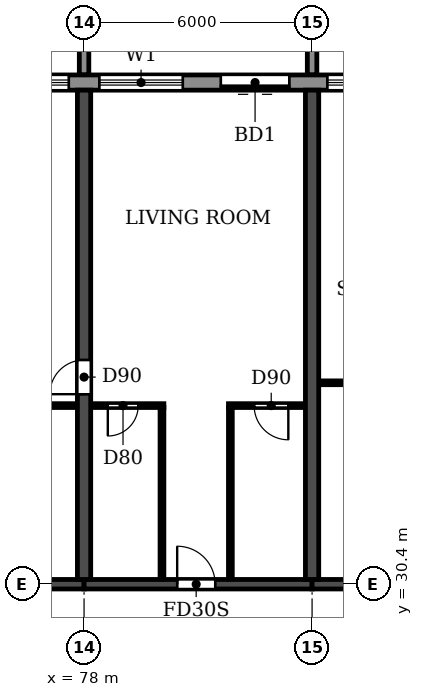
"""IFC4 building model, lengths in metres.
Left out: names, types, materials, properties, quantities, classifications, styles, units other than length and angle.
Written with IfcOpenShell. Run it as: python <this file> out.ifc"""

import sys

from ifc_helpers import new_model, si_unit, direction, frame, frame_2d, origin, place, context, subcontext, project, spatial, polyline, rectangle, outline, extrude, source, transform, mapped, element, fill, save


model = new_model("IFC4")
c1 = context("Model", 3, precision=1e-05, world=origin(), true_north=direction((0.0, 1.0)))
c2 = subcontext(c1, "Body", "Model", "MODEL_VIEW")
j1 = project(units=[si_unit("LENGTHUNIT", "METRE"), si_unit("PLANEANGLEUNIT", "RADIAN")], contexts=[c1])
p1 = place(None, origin())
s1 = spatial("IfcSite", under=j1, at=p1, CompositionType="ELEMENT")
p2 = place(p1, origin())
s2 = spatial("IfcBuilding", under=s1, at=p2, CompositionType="ELEMENT")
p3 = place(p2, frame((0.0, 0.0, 72.9)))
s3 = spatial("IfcBuildingStorey", under=s2, at=p3, CompositionType="ELEMENT", Elevation=72.9)
p4 = place(p3, frame((78.0, 30.525, 0.0), z_axis=(0.0, 0.0, 1.0), x_axis=(0.0, 1.0, 0.0)))
e1 = element("IfcWall", 1, at=p4, inside=s3, PredefinedType="SHEAR", context=c2, shape_type="SweptSolid", body=[
    extrude(rectangle(XDim=12.875, YDim=0.35, at=frame_2d((6.438, 0.0))), origin(), (0.0, 0.0, 1.0), 3.06),
])
p5 = place(p4, frame((4.875, 0.0, 0.0)))
e2 = element("IfcOpeningElement", 2, at=p5, cuts=e1, PredefinedType="OPENING", context=c2, shape_type="SweptSolid", body=[
    extrude(rectangle(XDim=0.9, YDim=2.1, at=frame_2d((0.45, 1.05))), frame((0.0, 0.185, 0.0), z_axis=(0.0, -1.0, 0.0), x_axis=(1.0, 0.0, 0.0)), (0.0, 0.0, 1.0), 0.37),
])
p6 = place(p3, frame((84.0, 30.525, 0.0), z_axis=(0.0, 0.0, 1.0), x_axis=(0.0, 1.0, 0.0)))
e3 = element("IfcWall", 3, at=p6, inside=s3, PredefinedType="SHEAR", context=c2, shape_type="SweptSolid", body=[
    extrude(rectangle(XDim=12.875, YDim=0.35, at=frame_2d((6.438, 0.0))), origin(), (0.0, 0.0, 1.0), 3.06),
])
p7 = place(p3, frame((72.0, 30.4, 0.0), z_axis=(0.0, 0.0, 1.0), x_axis=(1.0, 0.0, 0.0)))
e4 = element("IfcWall", 4, at=p7, inside=s3, PredefinedType="SHEAR", context=c2, shape_type="SweptSolid", body=[
    extrude(rectangle(XDim=6.0, YDim=0.25, at=frame_2d((3.0, 0.0))), origin(), (0.0, 0.0, 1.0), 2.46),
])
p8 = place(p3, frame((78.0, 30.4, 0.0), z_axis=(0.0, 0.0, 1.0), x_axis=(1.0, 0.0, 0.0)))
e5 = element("IfcWall", 5, at=p8, inside=s3, PredefinedType="SHEAR", context=c2, shape_type="SweptSolid", body=[
    extrude(rectangle(XDim=6.0, YDim=0.25, at=frame_2d((3.0, 0.0))), origin(), (0.0, 0.0, 1.0), 2.46),
])
p9 = place(p8, frame((2.45, 0.0, 0.0)))
e6 = element("IfcOpeningElement", 6, at=p9, cuts=e5, PredefinedType="OPENING", context=c2, shape_type="SweptSolid", body=[
    extrude(rectangle(XDim=1.0, YDim=2.1, at=frame_2d((0.5, 1.05))), frame((0.0, 0.135, 0.0), z_axis=(0.0, -1.0, 0.0), x_axis=(1.0, 0.0, 0.0)), (0.0, 0.0, 1.0), 0.27),
])
p10 = place(p3, frame((84.0, 30.4, 0.0), z_axis=(0.0, 0.0, 1.0), x_axis=(1.0, 0.0, 0.0)))
e7 = element("IfcWall", 7, at=p10, inside=s3, PredefinedType="SHEAR", context=c2, shape_type="SweptSolid", body=[
    extrude(rectangle(XDim=6.0, YDim=0.25, at=frame_2d((3.0, 0.0))), origin(), (0.0, 0.0, 1.0), 2.46),
])
p11 = place(p10, frame((2.55, 0.0, 0.0)))
e8 = element("IfcOpeningElement", 8, at=p11, cuts=e7, PredefinedType="OPENING", context=c2, shape_type="SweptSolid", body=[
    extrude(rectangle(XDim=1.0, YDim=2.1, at=frame_2d((0.5, 1.05))), frame((0.0, 0.135, 0.0), z_axis=(0.0, -1.0, 0.0), x_axis=(1.0, 0.0, 0.0)), (0.0, 0.0, 1.0), 0.27),
])
p12 = place(p3, frame((91.317, 43.6, 0.0), z_axis=(0.0, 0.0, 1.0), x_axis=(-1.0, 0.0, 0.0)))
e9 = element("IfcWall", 9, at=p12, inside=s3, PredefinedType="STANDARD", context=c2, shape_type="SweptSolid", body=[
    extrude(rectangle(XDim=80.634, YDim=0.4, at=frame_2d((40.317, 0.0))), origin(), (0.0, 0.0, 1.0), 3.06),
])
p13 = place(p12, frame((76.717, 0.0, 0.9)))
e10 = element("IfcOpeningElement", 10, at=p13, cuts=e9, PredefinedType="OPENING", context=c2, shape_type="SweptSolid", body=[
    extrude(rectangle(XDim=2.2, YDim=1.5, at=frame_2d((1.1, 0.75))), frame((0.0, 0.21, 0.0), z_axis=(0.0, -1.0, 0.0), x_axis=(1.0, 0.0, 0.0)), (0.0, 0.0, 1.0), 0.42),
])
p14 = place(p12, frame((73.917, 0.0, 0.0)))
e11 = element("IfcOpeningElement", 11, at=p14, cuts=e9, PredefinedType="OPENING", context=c2, shape_type="SweptSolid", body=[
    extrude(rectangle(XDim=1.8, YDim=2.4, at=frame_2d((0.9, 1.2))), frame((0.0, 0.21, 0.0), z_axis=(0.0, -1.0, 0.0), x_axis=(1.0, 0.0, 0.0)), (0.0, 0.0, 1.0), 0.42),
])
p15 = place(p12, frame((70.917, 0.0, 0.0)))
e12 = element("IfcOpeningElement", 12, at=p15, cuts=e9, PredefinedType="OPENING", context=c2, shape_type="SweptSolid", body=[
    extrude(rectangle(XDim=1.8, YDim=2.4, at=frame_2d((0.9, 1.2))), frame((0.0, 0.21, 0.0), z_axis=(0.0, -1.0, 0.0), x_axis=(1.0, 0.0, 0.0)), (0.0, 0.0, 1.0), 0.42),
])
p16 = place(p12, frame((67.717, 0.0, 0.9)))
e13 = element("IfcOpeningElement", 13, at=p16, cuts=e9, PredefinedType="OPENING", context=c2, shape_type="SweptSolid", body=[
    extrude(rectangle(XDim=2.2, YDim=1.5, at=frame_2d((1.1, 0.75))), frame((0.0, 0.21, 0.0), z_axis=(0.0, -1.0, 0.0), x_axis=(1.0, 0.0, 0.0)), (0.0, 0.0, 1.0), 0.42),
])
p17 = place(p12, frame((64.717, 0.0, 0.9)))
e14 = element("IfcOpeningElement", 14, at=p17, cuts=e9, PredefinedType="OPENING", context=c2, shape_type="SweptSolid", body=[
    extrude(rectangle(XDim=2.2, YDim=1.5, at=frame_2d((1.1, 0.75))), frame((0.0, 0.21, 0.0), z_axis=(0.0, -1.0, 0.0), x_axis=(1.0, 0.0, 0.0)), (0.0, 0.0, 1.0), 0.42),
])
p18 = place(p12, frame((61.917, 0.0, 0.0)))
e15 = element("IfcOpeningElement", 15, at=p18, cuts=e9, PredefinedType="OPENING", context=c2, shape_type="SweptSolid", body=[
    extrude(rectangle(XDim=1.8, YDim=2.4, at=frame_2d((0.9, 1.2))), frame((0.0, 0.21, 0.0), z_axis=(0.0, -1.0, 0.0), x_axis=(1.0, 0.0, 0.0)), (0.0, 0.0, 1.0), 0.42),
])
p19 = place(p12, frame((58.717, 0.0, 0.9)))
e16 = element("IfcOpeningElement", 16, at=p19, cuts=e9, PredefinedType="OPENING", context=c2, shape_type="SweptSolid", body=[
    extrude(rectangle(XDim=2.2, YDim=1.5, at=frame_2d((1.1, 0.75))), frame((0.0, 0.21, 0.0), z_axis=(0.0, -1.0, 0.0), x_axis=(1.0, 0.0, 0.0)), (0.0, 0.0, 1.0), 0.42),
])
p20 = place(p12, frame((55.917, 0.0, 0.0)))
e17 = element("IfcOpeningElement", 17, at=p20, cuts=e9, PredefinedType="OPENING", context=c2, shape_type="SweptSolid", body=[
    extrude(rectangle(XDim=1.8, YDim=2.4, at=frame_2d((0.9, 1.2))), frame((0.0, 0.21, 0.0), z_axis=(0.0, -1.0, 0.0), x_axis=(1.0, 0.0, 0.0)), (0.0, 0.0, 1.0), 0.42),
])
p21 = place(p12, frame((52.717, 0.0, 0.9)))
e18 = element("IfcOpeningElement", 18, at=p21, cuts=e9, PredefinedType="OPENING", context=c2, shape_type="SweptSolid", body=[
    extrude(rectangle(XDim=2.2, YDim=1.5, at=frame_2d((1.1, 0.75))), frame((0.0, 0.21, 0.0), z_axis=(0.0, -1.0, 0.0), x_axis=(1.0, 0.0, 0.0)), (0.0, 0.0, 1.0), 0.42),
])
p22 = place(p12, frame((49.717, 0.0, 0.9)))
e19 = element("IfcOpeningElement", 19, at=p22, cuts=e9, PredefinedType="OPENING", context=c2, shape_type="SweptSolid", body=[
    extrude(rectangle(XDim=2.2, YDim=1.5, at=frame_2d((1.1, 0.75))), frame((0.0, 0.21, 0.0), z_axis=(0.0, -1.0, 0.0), x_axis=(1.0, 0.0, 0.0)), (0.0, 0.0, 1.0), 0.42),
])
p23 = place(p12, frame((46.917, 0.0, 0.0)))
e20 = element("IfcOpeningElement", 20, at=p23, cuts=e9, PredefinedType="OPENING", context=c2, shape_type="SweptSolid", body=[
    extrude(rectangle(XDim=1.8, YDim=2.4, at=frame_2d((0.9, 1.2))), frame((0.0, 0.21, 0.0), z_axis=(0.0, -1.0, 0.0), x_axis=(1.0, 0.0, 0.0)), (0.0, 0.0, 1.0), 0.42),
])
p24 = place(p12, frame((43.717, 0.0, 0.9)))
e21 = element("IfcOpeningElement", 21, at=p24, cuts=e9, PredefinedType="OPENING", context=c2, shape_type="SweptSolid", body=[
    extrude(rectangle(XDim=2.2, YDim=1.5, at=frame_2d((1.1, 0.75))), frame((0.0, 0.21, 0.0), z_axis=(0.0, -1.0, 0.0), x_axis=(1.0, 0.0, 0.0)), (0.0, 0.0, 1.0), 0.42),
])
p25 = place(p12, frame((40.717, 0.0, 0.9)))
e22 = element("IfcOpeningElement", 22, at=p25, cuts=e9, PredefinedType="OPENING", context=c2, shape_type="SweptSolid", body=[
    extrude(rectangle(XDim=2.2, YDim=1.5, at=frame_2d((1.1, 0.75))), frame((0.0, 0.21, 0.0), z_axis=(0.0, -1.0, 0.0), x_axis=(1.0, 0.0, 0.0)), (0.0, 0.0, 1.0), 0.42),
])
p26 = place(p12, frame((37.917, 0.0, 0.0)))
e23 = element("IfcOpeningElement", 23, at=p26, cuts=e9, PredefinedType="OPENING", context=c2, shape_type="SweptSolid", body=[
    extrude(rectangle(XDim=1.8, YDim=2.4, at=frame_2d((0.9, 1.2))), frame((0.0, 0.21, 0.0), z_axis=(0.0, -1.0, 0.0), x_axis=(1.0, 0.0, 0.0)), (0.0, 0.0, 1.0), 0.42),
])
p27 = place(p12, frame((34.717, 0.0, 0.9)))
e24 = element("IfcOpeningElement", 24, at=p27, cuts=e9, PredefinedType="OPENING", context=c2, shape_type="SweptSolid", body=[
    extrude(rectangle(XDim=2.2, YDim=1.5, at=frame_2d((1.1, 0.75))), frame((0.0, 0.21, 0.0), z_axis=(0.0, -1.0, 0.0), x_axis=(1.0, 0.0, 0.0)), (0.0, 0.0, 1.0), 0.42),
])
p28 = place(p12, frame((31.917, 0.0, 0.0)))
e25 = element("IfcOpeningElement", 25, at=p28, cuts=e9, PredefinedType="OPENING", context=c2, shape_type="SweptSolid", body=[
    extrude(rectangle(XDim=1.8, YDim=2.4, at=frame_2d((0.9, 1.2))), frame((0.0, 0.21, 0.0), z_axis=(0.0, -1.0, 0.0), x_axis=(1.0, 0.0, 0.0)), (0.0, 0.0, 1.0), 0.42),
])
p29 = place(p12, frame((28.717, 0.0, 0.9)))
e26 = element("IfcOpeningElement", 26, at=p29, cuts=e9, PredefinedType="OPENING", context=c2, shape_type="SweptSolid", body=[
    extrude(rectangle(XDim=2.2, YDim=1.5, at=frame_2d((1.1, 0.75))), frame((0.0, 0.21, 0.0), z_axis=(0.0, -1.0, 0.0), x_axis=(1.0, 0.0, 0.0)), (0.0, 0.0, 1.0), 0.42),
])
p30 = place(p12, frame((25.717, 0.0, 0.9)))
e27 = element("IfcOpeningElement", 27, at=p30, cuts=e9, PredefinedType="OPENING", context=c2, shape_type="SweptSolid", body=[
    extrude(rectangle(XDim=2.2, YDim=1.5, at=frame_2d((1.1, 0.75))), frame((0.0, 0.21, 0.0), z_axis=(0.0, -1.0, 0.0), x_axis=(1.0, 0.0, 0.0)), (0.0, 0.0, 1.0), 0.42),
])
p31 = place(p12, frame((22.717, 0.0, 0.9)))
e28 = element("IfcOpeningElement", 28, at=p31, cuts=e9, PredefinedType="OPENING", context=c2, shape_type="SweptSolid", body=[
    extrude(rectangle(XDim=2.2, YDim=1.5, at=frame_2d((1.1, 0.75))), frame((0.0, 0.21, 0.0), z_axis=(0.0, -1.0, 0.0), x_axis=(1.0, 0.0, 0.0)), (0.0, 0.0, 1.0), 0.42),
])
p32 = place(p12, frame((19.917, 0.0, 0.0)))
e29 = element("IfcOpeningElement", 29, at=p32, cuts=e9, PredefinedType="OPENING", context=c2, shape_type="SweptSolid", body=[
    extrude(rectangle(XDim=1.8, YDim=2.4, at=frame_2d((0.9, 1.2))), frame((0.0, 0.21, 0.0), z_axis=(0.0, -1.0, 0.0), x_axis=(1.0, 0.0, 0.0)), (0.0, 0.0, 1.0), 0.42),
])
p33 = place(p12, frame((16.717, 0.0, 0.9)))
e30 = element("IfcOpeningElement", 30, at=p33, cuts=e9, PredefinedType="OPENING", context=c2, shape_type="SweptSolid", body=[
    extrude(rectangle(XDim=2.2, YDim=1.5, at=frame_2d((1.1, 0.75))), frame((0.0, 0.21, 0.0), z_axis=(0.0, -1.0, 0.0), x_axis=(1.0, 0.0, 0.0)), (0.0, 0.0, 1.0), 0.42),
])
p34 = place(p12, frame((13.717, 0.0, 0.9)))
e31 = element("IfcOpeningElement", 31, at=p34, cuts=e9, PredefinedType="OPENING", context=c2, shape_type="SweptSolid", body=[
    extrude(rectangle(XDim=2.2, YDim=1.5, at=frame_2d((1.1, 0.75))), frame((0.0, 0.21, 0.0), z_axis=(0.0, -1.0, 0.0), x_axis=(1.0, 0.0, 0.0)), (0.0, 0.0, 1.0), 0.42),
])
p35 = place(p12, frame((10.717, 0.0, 0.9)))
e32 = element("IfcOpeningElement", 32, at=p35, cuts=e9, PredefinedType="OPENING", context=c2, shape_type="SweptSolid", body=[
    extrude(rectangle(XDim=2.2, YDim=1.5, at=frame_2d((1.1, 0.75))), frame((0.0, 0.21, 0.0), z_axis=(0.0, -1.0, 0.0), x_axis=(1.0, 0.0, 0.0)), (0.0, 0.0, 1.0), 0.42),
])
p36 = place(p12, frame((7.917, 0.0, 0.0)))
e33 = element("IfcOpeningElement", 33, at=p36, cuts=e9, PredefinedType="OPENING", context=c2, shape_type="SweptSolid", body=[
    extrude(rectangle(XDim=1.8, YDim=2.4, at=frame_2d((0.9, 1.2))), frame((0.0, 0.21, 0.0), z_axis=(0.0, -1.0, 0.0), x_axis=(1.0, 0.0, 0.0)), (0.0, 0.0, 1.0), 0.42),
])
p37 = place(p12, frame((4.717, 0.0, 0.9)))
e34 = element("IfcOpeningElement", 34, at=p37, cuts=e9, PredefinedType="OPENING", context=c2, shape_type="SweptSolid", body=[
    extrude(rectangle(XDim=2.2, YDim=1.5, at=frame_2d((1.1, 0.75))), frame((0.0, 0.21, 0.0), z_axis=(0.0, -1.0, 0.0), x_axis=(1.0, 0.0, 0.0)), (0.0, 0.0, 1.0), 0.42),
])
p38 = place(p12, frame((1.917, 0.0, 0.0)))
e35 = element("IfcOpeningElement", 35, at=p38, cuts=e9, PredefinedType="OPENING", context=c2, shape_type="SweptSolid", body=[
    extrude(rectangle(XDim=1.8, YDim=2.4, at=frame_2d((0.9, 1.2))), frame((0.0, 0.21, 0.0), z_axis=(0.0, -1.0, 0.0), x_axis=(1.0, 0.0, 0.0)), (0.0, 0.0, 1.0), 0.42),
])
m1 = source(origin(), c2, "Body", "SweptSolid", [
    extrude(outline(polyline([(0.0, 0.0), (0.25, 0.0), (0.25, 3.1), (0.0, 3.1), (0.0, 0.0)])), origin(), (0.0, 0.0, 1.0), 3.1),
])
for number, where in (
    (36, (77.875, 43.8, 0.0)),
    (37, (83.875, 43.8, 0.0)),
):
    element("IfcWall", number, at=place(p3, frame(where)), inside=s3, PredefinedType="STANDARD", context=c2, shape_type="MappedRepresentation", body=[
        mapped(m1, transform((0.0, 0.0, 0.0))),
    ])
p39 = place(p3, frame((75.1, 35.1, 0.0), z_axis=(0.0, 0.0, 1.0), x_axis=(1.0, 0.0, 0.0)))
e38 = element("IfcWall", 38, at=p39, inside=s3, PredefinedType="PARTITIONING", context=c2, shape_type="SweptSolid", body=[
    extrude(rectangle(XDim=2.715, YDim=0.1, at=frame_2d((1.357, 0.0))), origin(), (0.0, 0.0, 1.0), 3.06),
])
p40 = place(p39, frame((1.0, 0.0, 0.0)))
e39 = element("IfcOpeningElement", 39, at=p40, cuts=e38, PredefinedType="OPENING", context=c2, shape_type="SweptSolid", body=[
    extrude(rectangle(XDim=0.8, YDim=2.1, at=frame_2d((0.4, 1.05))), frame((0.0, 0.06, 0.0), z_axis=(0.0, -1.0, 0.0), x_axis=(1.0, 0.0, 0.0)), (0.0, 0.0, 1.0), 0.12),
])
p41 = place(p3, frame((78.185, 35.1, 0.0), z_axis=(0.0, 0.0, 1.0), x_axis=(1.0, 0.0, 0.0)))
e40 = element("IfcWall", 40, at=p41, inside=s3, PredefinedType="PARTITIONING", context=c2, shape_type="SweptSolid", body=[
    extrude(rectangle(XDim=1.915, YDim=0.1, at=frame_2d((0.958, 0.0))), origin(), (0.0, 0.0, 1.0), 3.06),
])
p42 = place(p41, frame((0.44, 0.0, 0.0)))
e41 = element("IfcOpeningElement", 41, at=p42, cuts=e40, PredefinedType="OPENING", context=c2, shape_type="SweptSolid", body=[
    extrude(rectangle(XDim=0.8, YDim=2.1, at=frame_2d((0.4, 1.05))), frame((0.0, 0.06, 0.0), z_axis=(0.0, -1.0, 0.0), x_axis=(1.0, 0.0, 0.0)), (0.0, 0.0, 1.0), 0.12),
])
p43 = place(p3, frame((81.8, 35.1, 0.0), z_axis=(0.0, 0.0, 1.0), x_axis=(1.0, 0.0, 0.0)))
e42 = element("IfcWall", 42, at=p43, inside=s3, PredefinedType="PARTITIONING", context=c2, shape_type="SweptSolid", body=[
    extrude(rectangle(XDim=2.015, YDim=0.1, at=frame_2d((1.007, 0.0))), origin(), (0.0, 0.0, 1.0), 3.06),
])
p44 = place(p43, frame((0.675, 0.0, 0.0)))
e43 = element("IfcOpeningElement", 43, at=p44, cuts=e42, PredefinedType="OPENING", context=c2, shape_type="SweptSolid", body=[
    extrude(rectangle(XDim=0.9, YDim=2.1, at=frame_2d((0.45, 1.05))), frame((0.0, 0.06, 0.0), z_axis=(0.0, -1.0, 0.0), x_axis=(1.0, 0.0, 0.0)), (0.0, 0.0, 1.0), 0.12),
])
p45 = place(p3, frame((84.185, 35.7, 0.0), z_axis=(0.0, 0.0, 1.0), x_axis=(1.0, 0.0, 0.0)))
e44 = element("IfcWall", 44, at=p45, inside=s3, PredefinedType="PARTITIONING", context=c2, shape_type="SweptSolid", body=[
    extrude(rectangle(XDim=2.015, YDim=0.1, at=frame_2d((1.007, 0.0))), origin(), (0.0, 0.0, 1.0), 3.06),
])
for number, where, z_axis, x_axis in (
    (45, (80.05, 30.535, 0.0), (0.0, 0.0, 1.0), (0.0, 1.0, 0.0)),
    (46, (81.85, 30.535, 0.0), (0.0, 0.0, 1.0), (0.0, 1.0, 0.0)),
):
    element("IfcWall", number, at=place(p3, frame(where, z_axis=z_axis, x_axis=x_axis)), inside=s3, PredefinedType="PARTITIONING", context=c2, shape_type="SweptSolid", body=[
        extrude(rectangle(XDim=4.515, YDim=0.1, at=frame_2d((2.258, 0.0))), origin(), (0.0, 0.0, 1.0), 3.06),
    ])
p46 = place(p34, origin())
e47 = element("IfcWindow", 47, at=p46, inside=s3, PartitioningType="DOUBLE_PANEL_HORIZONTAL", PredefinedType="WINDOW", context=c2, shape_type="SweptSolid", body=[
    extrude(rectangle(XDim=2.2, YDim=1.5, at=frame_2d((1.1, 0.75))), frame((0.0, 0.03, 0.0), z_axis=(0.0, -1.0, 0.0), x_axis=(1.0, 0.0, 0.0)), (0.0, 0.0, 1.0), 0.06),
])
fill(e31, e47)
p47 = place(p35, origin())
e48 = element("IfcWindow", 48, at=p47, inside=s3, PartitioningType="DOUBLE_PANEL_HORIZONTAL", PredefinedType="WINDOW", context=c2, shape_type="SweptSolid", body=[
    extrude(rectangle(XDim=2.2, YDim=1.5, at=frame_2d((1.1, 0.75))), frame((0.0, 0.03, 0.0), z_axis=(0.0, -1.0, 0.0), x_axis=(1.0, 0.0, 0.0)), (0.0, 0.0, 1.0), 0.06),
])
fill(e32, e48)
p48 = place(p36, origin())
e49 = element("IfcDoor", 49, at=p48, inside=s3, OperationType="DOUBLE_DOOR_SLIDING", PredefinedType="DOOR", context=c2, shape_type="SweptSolid", body=[
    extrude(rectangle(XDim=1.8, YDim=2.4, at=frame_2d((0.9, 1.2))), frame((0.0, 0.025, 0.0), z_axis=(0.0, -1.0, 0.0), x_axis=(1.0, 0.0, 0.0)), (0.0, 0.0, 1.0), 0.05),
])
fill(e33, e49)
p49 = place(p37, origin())
e50 = element("IfcWindow", 50, at=p49, inside=s3, PartitioningType="DOUBLE_PANEL_HORIZONTAL", PredefinedType="WINDOW", context=c2, shape_type="SweptSolid", body=[
    extrude(rectangle(XDim=2.2, YDim=1.5, at=frame_2d((1.1, 0.75))), frame((0.0, 0.03, 0.0), z_axis=(0.0, -1.0, 0.0), x_axis=(1.0, 0.0, 0.0)), (0.0, 0.0, 1.0), 0.06),
])
fill(e34, e50)
p50 = place(p5, origin())
e51 = element("IfcDoor", 51, at=p50, inside=s3, OperationType="SINGLE_SWING_LEFT", PredefinedType="DOOR", context=c2, shape_type="SweptSolid", body=[
    extrude(rectangle(XDim=0.9, YDim=2.1, at=frame_2d((0.45, 1.05))), frame((0.0, 0.025, 0.0), z_axis=(0.0, -1.0, 0.0), x_axis=(1.0, 0.0, 0.0)), (0.0, 0.0, 1.0), 0.05),
])
fill(e2, e51)
p51 = place(p42, frame((0.8, 0.0, 0.0), z_axis=(0.0, 0.0, 1.0), x_axis=(-1.0, 0.0, 0.0)))
e52 = element("IfcDoor", 52, at=p51, inside=s3, OperationType="SINGLE_SWING_RIGHT", PredefinedType="DOOR", context=c2, shape_type="SweptSolid", body=[
    extrude(rectangle(XDim=0.8, YDim=2.1, at=frame_2d((0.4, 1.05))), frame((0.0, 0.025, 0.0), z_axis=(0.0, -1.0, 0.0), x_axis=(1.0, 0.0, 0.0)), (0.0, 0.0, 1.0), 0.05),
])
fill(e41, e52)
p52 = place(p9, origin())
e53 = element("IfcDoor", 53, at=p52, inside=s3, OperationType="SINGLE_SWING_LEFT", PredefinedType="DOOR", context=c2, shape_type="SweptSolid", body=[
    extrude(rectangle(XDim=1.0, YDim=2.1, at=frame_2d((0.5, 1.05))), frame((0.0, 0.025, 0.0), z_axis=(0.0, -1.0, 0.0), x_axis=(1.0, 0.0, 0.0)), (0.0, 0.0, 1.0), 0.05),
])
fill(e6, e53)
p53 = place(p44, frame((0.9, 0.0, 0.0), z_axis=(0.0, 0.0, 1.0), x_axis=(-1.0, 0.0, 0.0)))
e54 = element("IfcDoor", 54, at=p53, inside=s3, OperationType="SINGLE_SWING_LEFT", PredefinedType="DOOR", context=c2, shape_type="SweptSolid", body=[
    extrude(rectangle(XDim=0.9, YDim=2.1, at=frame_2d((0.45, 1.05))), frame((0.0, 0.025, 0.0), z_axis=(0.0, -1.0, 0.0), x_axis=(1.0, 0.0, 0.0)), (0.0, 0.0, 1.0), 0.05),
])
fill(e43, e54)
save(model, sys.argv[1])
